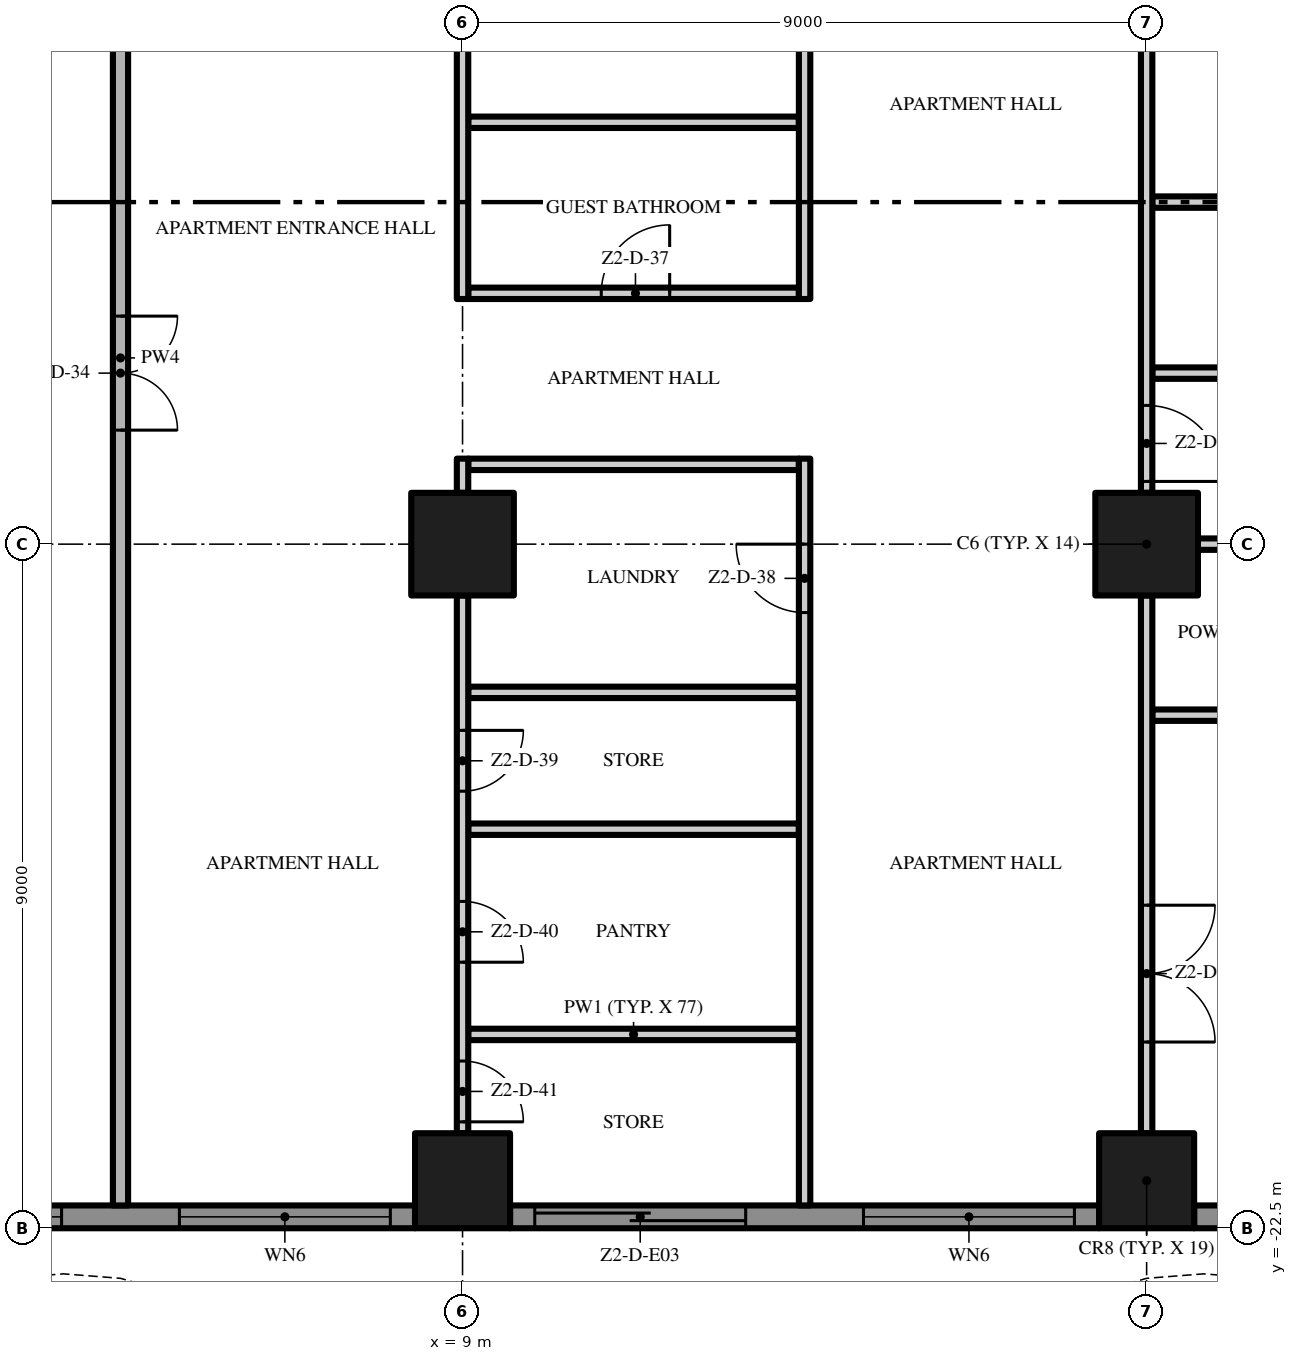
"""IFC4 building model, lengths in metres.
Left out: names, types, materials, properties, quantities, classifications, styles, units other than length and angle.
Written with IfcOpenShell. Run it as: python <this file> out.ifc"""

import sys

from ifc_helpers import new_model, si_unit, direction, frame, frame_2d, origin, origin_2d, place, context, subcontext, project, spatial, polyline, rectangle, outline, extrude, element, fill, save


model = new_model("IFC4")
c1 = context("Model", 3, precision=1e-05, world=origin(), true_north=direction((0.0, 1.0)))
c2 = subcontext(c1, "Body", "Model", "MODEL_VIEW")
j1 = project(units=[si_unit("LENGTHUNIT", "METRE"), si_unit("PLANEANGLEUNIT", "RADIAN")], contexts=[c1])
p1 = place(None, origin())
s1 = spatial("IfcSite", under=j1, at=p1, CompositionType="ELEMENT")
p2 = place(p1, origin())
s2 = spatial("IfcBuilding", under=s1, at=p2, CompositionType="ELEMENT")
p3 = place(p2, frame((0.0, 0.0, 107.4)))
s3 = spatial("IfcBuildingStorey", under=s2, at=p3, CompositionType="ELEMENT", Elevation=107.4)
p4 = place(p3, frame((18.0, -13.5, 0.0), z_axis=(0.0, 0.0, 1.0), x_axis=(1.0, 0.0, 0.0)))
e1 = element("IfcColumn", 1, at=p4, inside=s3, PredefinedType="COLUMN", context=c2, shape_type="SweptSolid", body=[
    extrude(rectangle(XDim=1.35, YDim=1.35, at=origin_2d()), origin(), (0.0, 0.0, 1.0), 3.5),
])
p5 = place(p3, frame((18.0, -21.875, 0.0), z_axis=(0.0, 0.0, 1.0), x_axis=(1.0, 0.0, 0.0)))
e2 = element("IfcColumn", 2, at=p5, inside=s3, PredefinedType="COLUMN", context=c2, shape_type="SweptSolid", body=[
    extrude(rectangle(XDim=1.25, YDim=1.25, at=origin_2d()), origin(), (0.0, 0.0, 1.0), 3.5),
])
p6 = place(p3, frame((9.0, -13.5, 0.0), z_axis=(0.0, 0.0, 1.0), x_axis=(1.0, 0.0, 0.0)))
e3 = element("IfcColumn", 3, at=p6, inside=s3, PredefinedType="COLUMN", context=c2, shape_type="SweptSolid", body=[
    extrude(rectangle(XDim=1.35, YDim=1.35, at=origin_2d()), origin(), (0.0, 0.0, 1.0), 3.5),
])
p7 = place(p3, frame((9.0, -21.875, 0.0), z_axis=(0.0, 0.0, 1.0), x_axis=(1.0, 0.0, 0.0)))
e4 = element("IfcColumn", 4, at=p7, inside=s3, PredefinedType="COLUMN", context=c2, shape_type="SweptSolid", body=[
    extrude(rectangle(XDim=1.25, YDim=1.25, at=origin_2d()), origin(), (0.0, 0.0, 1.0), 3.5),
])
p8 = place(p3, frame((8.375, -22.35, 0.0), z_axis=(0.0, 0.0, 1.0), x_axis=(-1.0, 0.0, 0.0)))
e5 = element("IfcWall", 5, at=p8, inside=s3, PredefinedType="SOLIDWALL", context=c2, shape_type="SweptSolid", body=[
    extrude(rectangle(XDim=7.75, YDim=0.3, at=frame_2d((3.875, 0.0))), origin(), (0.0, 0.0, 1.0), 3.5),
])
p9 = place(p8, frame((4.65, 0.0, 0.45)))
e6 = element("IfcOpeningElement", 6, at=p9, cuts=e5, PredefinedType="OPENING", context=c2, shape_type="SweptSolid", body=[
    extrude(rectangle(XDim=2.775, YDim=2.65, at=frame_2d((1.387, 1.325))), frame((0.0, 0.16, 0.0), z_axis=(0.0, -1.0, 0.0), x_axis=(1.0, 0.0, 0.0)), (0.0, 0.0, 1.0), 0.32),
])
p10 = place(p8, frame((0.325, 0.0, 0.45)))
e7 = element("IfcOpeningElement", 7, at=p10, cuts=e5, PredefinedType="OPENING", context=c2, shape_type="SweptSolid", body=[
    extrude(rectangle(XDim=2.775, YDim=2.65, at=frame_2d((1.387, 1.325))), frame((0.0, 0.16, 0.0), z_axis=(0.0, -1.0, 0.0), x_axis=(1.0, 0.0, 0.0)), (0.0, 0.0, 1.0), 0.32),
])
p11 = place(p3, frame((17.375, -22.35, 0.0), z_axis=(0.0, 0.0, 1.0), x_axis=(-1.0, 0.0, 0.0)))
e8 = element("IfcWall", 8, at=p11, inside=s3, PredefinedType="SOLIDWALL", context=c2, shape_type="SweptSolid", body=[
    extrude(rectangle(XDim=7.75, YDim=0.3, at=frame_2d((3.875, 0.0))), origin(), (0.0, 0.0, 1.0), 3.5),
])
p12 = place(p11, frame((4.65, 0.0, 0.0)))
e9 = element("IfcOpeningElement", 9, at=p12, cuts=e8, PredefinedType="OPENING", context=c2, shape_type="SweptSolid", body=[
    extrude(rectangle(XDim=2.775, YDim=2.4, at=frame_2d((1.387, 1.2))), frame((0.0, 0.16, 0.0), z_axis=(0.0, -1.0, 0.0), x_axis=(1.0, 0.0, 0.0)), (0.0, 0.0, 1.0), 0.32),
])
p13 = place(p11, frame((0.325, 0.0, 0.45)))
e10 = element("IfcOpeningElement", 10, at=p13, cuts=e8, PredefinedType="OPENING", context=c2, shape_type="SweptSolid", body=[
    extrude(rectangle(XDim=2.775, YDim=2.65, at=frame_2d((1.387, 1.325))), frame((0.0, 0.16, 0.0), z_axis=(0.0, -1.0, 0.0), x_axis=(1.0, 0.0, 0.0)), (0.0, 0.0, 1.0), 0.32),
])
p14 = place(p3, frame((22.5, -22.35, 0.0), z_axis=(0.0, 0.0, 1.0), x_axis=(-1.0, 0.0, 0.0)))
e11 = element("IfcWall", 11, at=p14, inside=s3, PredefinedType="SOLIDWALL", context=c2, shape_type="SweptSolid", body=[
    extrude(rectangle(XDim=3.875, YDim=0.3, at=frame_2d((1.938, 0.0))), origin(), (0.0, 0.0, 1.0), 3.5),
])
p15 = place(p14, frame((0.775, 0.0, 0.45)))
e12 = element("IfcOpeningElement", 12, at=p15, cuts=e11, PredefinedType="OPENING", context=c2, shape_type="SweptSolid", body=[
    extrude(rectangle(XDim=2.775, YDim=2.65, at=frame_2d((1.387, 1.325))), frame((0.0, 0.16, 0.0), z_axis=(0.0, -1.0, 0.0), x_axis=(1.0, 0.0, 0.0)), (0.0, 0.0, 1.0), 0.32),
])
p16 = place(p3, origin())
e13 = element("IfcWall", 13, at=p16, inside=s3, PredefinedType="USERDEFINED", context=c2, shape_type="SweptSolid", body=[
    extrude(outline(polyline([(-22.5, -24.3), (-21.0, -25.005), (-19.5, -25.441), (-18.75, -25.5), (-18.0, -25.441), (-16.5, -25.005), (-15.0, -24.3), (-13.5, -23.595), (-12.0, -23.159), (-11.25, -23.1), (-10.5, -23.159), (-9.0, -23.595), (-7.5, -24.3), (-6.0, -25.005), (-4.5, -25.441), (-3.75, -25.5), (-3.0, -25.441), (-1.5, -25.005), (0.0, -24.3), (1.5, -23.595), (3.0, -23.159), (3.75, -23.1), (4.5, -23.159), (6.0, -23.595), (7.5, -24.3), (9.0, -25.005), (10.5, -25.441), (11.25, -25.5), (12.0, -25.441), (13.5, -25.005), (15.0, -24.3), (16.5, -23.595), (18.0, -23.159), (18.75, -23.1), (19.5, -23.159), (21.0, -23.595), (22.5, -24.3), (22.606, -24.074), (21.089, -23.36), (19.545, -22.911), (18.75, -22.849), (17.955, -22.911), (16.411, -23.36), (14.894, -24.074), (13.411, -24.771), (11.955, -25.194), (11.25, -25.249), (10.545, -25.194), (9.089, -24.771), (7.606, -24.074), (6.089, -23.36), (4.545, -22.911), (3.75, -22.849), (2.955, -22.911), (1.411, -23.36), (-0.106, -24.074), (-1.589, -24.771), (-3.045, -25.194), (-3.75, -25.249), (-4.455, -25.194), (-5.911, -24.771), (-7.394, -24.074), (-8.911, -23.36), (-10.455, -22.911), (-11.25, -22.849), (-12.045, -22.911), (-13.589, -23.36), (-15.106, -24.074), (-16.589, -24.771), (-18.045, -25.194), (-18.75, -25.249), (-19.455, -25.194), (-20.911, -24.771), (-22.394, -24.074), (-22.5, -24.3)])), origin(), (0.0, 0.0, 1.0), 0.9),
])
for number, where, z_axis, x_axis in (
    (14, (9.075, -19.95, 0.0), (0.0, 0.0, 1.0), (1.0, 0.0, 0.0)),
    (15, (9.075, -17.25, 0.0), (0.0, 0.0, 1.0), (1.0, 0.0, 0.0)),
):
    element("IfcWall", number, at=place(p3, frame(where, z_axis=z_axis, x_axis=x_axis)), inside=s3, PredefinedType="PARTITIONING", context=c2, shape_type="SweptSolid", body=[
        extrude(rectangle(XDim=4.35, YDim=0.15, at=frame_2d((2.175, 0.0))), origin(), (0.0, 0.0, 1.0), 3.5),
    ])
p17 = place(p3, frame((18.075, -15.75, 0.0), z_axis=(0.0, 0.0, 1.0), x_axis=(1.0, 0.0, 0.0)))
e16 = element("IfcWall", 16, at=p17, inside=s3, PredefinedType="PARTITIONING", context=c2, shape_type="SweptSolid", body=[
    extrude(rectangle(XDim=2.85, YDim=0.15, at=frame_2d((1.425, 0.0))), origin(), (0.0, 0.0, 1.0), 3.5),
])
p18 = place(p3, frame((9.075, -15.45, 0.0), z_axis=(0.0, 0.0, 1.0), x_axis=(1.0, 0.0, 0.0)))
e17 = element("IfcWall", 17, at=p18, inside=s3, PredefinedType="PARTITIONING", context=c2, shape_type="SweptSolid", body=[
    extrude(rectangle(XDim=4.35, YDim=0.15, at=frame_2d((2.175, 0.0))), origin(), (0.0, 0.0, 1.0), 3.5),
])
p19 = place(p3, frame((18.675, -13.5, 0.0), z_axis=(0.0, 0.0, 1.0), x_axis=(1.0, 0.0, 0.0)))
e18 = element("IfcWall", 18, at=p19, inside=s3, PredefinedType="PARTITIONING", context=c2, shape_type="SweptSolid", body=[
    extrude(rectangle(XDim=7.075, YDim=0.15, at=frame_2d((3.538, 0.0))), origin(), (0.0, 0.0, 1.0), 3.5),
])
p20 = place(p3, frame((9.075, -12.45, 0.0), z_axis=(0.0, 0.0, 1.0), x_axis=(1.0, 0.0, 0.0)))
e19 = element("IfcWall", 19, at=p20, inside=s3, PredefinedType="PARTITIONING", context=c2, shape_type="SweptSolid", body=[
    extrude(rectangle(XDim=4.35, YDim=0.15, at=frame_2d((2.175, 0.0))), origin(), (0.0, 0.0, 1.0), 3.5),
])
p21 = place(p3, frame((18.075, -11.25, 0.0), z_axis=(0.0, 0.0, 1.0), x_axis=(1.0, 0.0, 0.0)))
e20 = element("IfcWall", 20, at=p21, inside=s3, PredefinedType="PARTITIONING", context=c2, shape_type="SweptSolid", body=[
    extrude(rectangle(XDim=2.85, YDim=0.15, at=frame_2d((1.425, 0.0))), origin(), (0.0, 0.0, 1.0), 3.5),
])
p22 = place(p3, frame((9.075, -10.2, 0.0), z_axis=(0.0, 0.0, 1.0), x_axis=(1.0, 0.0, 0.0)))
e21 = element("IfcWall", 21, at=p22, inside=s3, PredefinedType="PARTITIONING", context=c2, shape_type="SweptSolid", body=[
    extrude(rectangle(XDim=4.35, YDim=0.15, at=frame_2d((2.175, 0.0))), origin(), (0.0, 0.0, 1.0), 3.5),
])
p23 = place(p22, frame((1.75, 0.0, 0.0)))
e22 = element("IfcOpeningElement", 22, at=p23, cuts=e21, PredefinedType="OPENING", context=c2, shape_type="SweptSolid", body=[
    extrude(rectangle(XDim=0.9, YDim=2.1, at=frame_2d((0.45, 1.05))), frame((0.0, 0.085, 0.0), z_axis=(0.0, -1.0, 0.0), x_axis=(1.0, 0.0, 0.0)), (0.0, 0.0, 1.0), 0.17),
])
p24 = place(p3, frame((18.075, -9.0, 0.0), z_axis=(0.0, 0.0, 1.0), x_axis=(1.0, 0.0, 0.0)))
e23 = element("IfcWall", 23, at=p24, inside=s3, PredefinedType="PARTITIONING", context=c2, shape_type="SweptSolid", body=[
    extrude(rectangle(XDim=2.85, YDim=0.15, at=frame_2d((1.425, 0.0))), origin(), (0.0, 0.0, 1.0), 3.5),
])
p25 = place(p3, frame((9.075, -7.95, 0.0), z_axis=(0.0, 0.0, 1.0), x_axis=(1.0, 0.0, 0.0)))
e24 = element("IfcWall", 24, at=p25, inside=s3, PredefinedType="PARTITIONING", context=c2, shape_type="SweptSolid", body=[
    extrude(rectangle(XDim=4.35, YDim=0.15, at=frame_2d((2.175, 0.0))), origin(), (0.0, 0.0, 1.0), 3.5),
])
p26 = place(p3, frame((4.5, 0.1, 0.0), z_axis=(0.0, 0.0, 1.0), x_axis=(0.0, -1.0, 0.0)))
e25 = element("IfcWall", 25, at=p26, inside=s3, PredefinedType="PARTITIONING", context=c2, shape_type="SweptSolid", body=[
    extrude(rectangle(XDim=22.3, YDim=0.2, at=frame_2d((11.15, 0.0))), origin(), (0.0, 0.0, 1.0), 3.5),
])
p27 = place(p26, frame((10.6, 0.0, 0.0)))
e26 = element("IfcOpeningElement", 26, at=p27, cuts=e25, PredefinedType="OPENING", context=c2, shape_type="SweptSolid", body=[
    extrude(rectangle(XDim=1.5, YDim=2.4, at=frame_2d((0.75, 1.2))), frame((0.0, 0.11, 0.0), z_axis=(0.0, -1.0, 0.0), x_axis=(1.0, 0.0, 0.0)), (0.0, 0.0, 1.0), 0.22),
])
p28 = place(p3, frame((9.0, -14.175, 0.0), z_axis=(0.0, 0.0, 1.0), x_axis=(0.0, -1.0, 0.0)))
e27 = element("IfcWall", 27, at=p28, inside=s3, PredefinedType="PARTITIONING", context=c2, shape_type="SweptSolid", body=[
    extrude(rectangle(XDim=7.075, YDim=0.15, at=frame_2d((3.538, 0.0))), origin(), (0.0, 0.0, 1.0), 3.5),
])
p29 = place(p28, frame((1.775, 0.0, 0.0)))
e28 = element("IfcOpeningElement", 28, at=p29, cuts=e27, PredefinedType="OPENING", context=c2, shape_type="SweptSolid", body=[
    extrude(rectangle(XDim=0.8, YDim=2.0, at=frame_2d((0.4, 1.0))), frame((0.0, 0.085, 0.0), z_axis=(0.0, -1.0, 0.0), x_axis=(1.0, 0.0, 0.0)), (0.0, 0.0, 1.0), 0.17),
])
p30 = place(p28, frame((4.025, 0.0, 0.0)))
e29 = element("IfcOpeningElement", 29, at=p30, cuts=e27, PredefinedType="OPENING", context=c2, shape_type="SweptSolid", body=[
    extrude(rectangle(XDim=0.8, YDim=2.0, at=frame_2d((0.4, 1.0))), frame((0.0, 0.085, 0.0), z_axis=(0.0, -1.0, 0.0), x_axis=(1.0, 0.0, 0.0)), (0.0, 0.0, 1.0), 0.17),
])
p31 = place(p28, frame((6.125, 0.0, 0.0)))
e30 = element("IfcOpeningElement", 30, at=p31, cuts=e27, PredefinedType="OPENING", context=c2, shape_type="SweptSolid", body=[
    extrude(rectangle(XDim=0.8, YDim=2.0, at=frame_2d((0.4, 1.0))), frame((0.0, 0.085, 0.0), z_axis=(0.0, -1.0, 0.0), x_axis=(1.0, 0.0, 0.0)), (0.0, 0.0, 1.0), 0.17),
])
p32 = place(p3, frame((9.0, -12.825, 0.0), z_axis=(0.0, 0.0, 1.0), x_axis=(0.0, 1.0, 0.0)))
e31 = element("IfcWall", 31, at=p32, inside=s3, PredefinedType="PARTITIONING", context=c2, shape_type="SweptSolid", body=[
    extrude(rectangle(XDim=0.45, YDim=0.15, at=frame_2d((0.225, 0.0))), origin(), (0.0, 0.0, 1.0), 3.5),
])
p33 = place(p3, frame((9.0, -5.175, 0.0), z_axis=(0.0, 0.0, 1.0), x_axis=(0.0, -1.0, 0.0)))
e32 = element("IfcWall", 32, at=p33, inside=s3, PredefinedType="PARTITIONING", context=c2, shape_type="SweptSolid", body=[
    extrude(rectangle(XDim=5.1, YDim=0.15, at=frame_2d((2.55, 0.0))), origin(), (0.0, 0.0, 1.0), 3.5),
])
p34 = place(p33, frame((0.15, 0.0, 0.0)))
e33 = element("IfcOpeningElement", 33, at=p34, cuts=e32, PredefinedType="OPENING", context=c2, shape_type="SweptSolid", body=[
    extrude(rectangle(XDim=1.0, YDim=2.4, at=frame_2d((0.5, 1.2))), frame((0.0, 0.085, 0.0), z_axis=(0.0, -1.0, 0.0), x_axis=(1.0, 0.0, 0.0)), (0.0, 0.0, 1.0), 0.17),
])
p35 = place(p3, frame((13.5, -22.2, 0.0), z_axis=(0.0, 0.0, 1.0), x_axis=(0.0, 1.0, 0.0)))
e34 = element("IfcWall", 34, at=p35, inside=s3, PredefinedType="PARTITIONING", context=c2, shape_type="SweptSolid", body=[
    extrude(rectangle(XDim=9.825, YDim=0.15, at=frame_2d((4.912, 0.0))), origin(), (0.0, 0.0, 1.0), 3.5),
])
p36 = place(p35, frame((7.8, 0.0, 0.0)))
e35 = element("IfcOpeningElement", 35, at=p36, cuts=e34, PredefinedType="OPENING", context=c2, shape_type="SweptSolid", body=[
    extrude(rectangle(XDim=0.9, YDim=2.1, at=frame_2d((0.45, 1.05))), frame((0.0, 0.085, 0.0), z_axis=(0.0, -1.0, 0.0), x_axis=(1.0, 0.0, 0.0)), (0.0, 0.0, 1.0), 0.17),
])
p37 = place(p3, frame((13.5, -10.275, 0.0), z_axis=(0.0, 0.0, 1.0), x_axis=(0.0, 1.0, 0.0)))
e36 = element("IfcWall", 36, at=p37, inside=s3, PredefinedType="PARTITIONING", context=c2, shape_type="SweptSolid", body=[
    extrude(rectangle(XDim=10.175, YDim=0.15, at=frame_2d((5.088, 0.0))), origin(), (0.0, 0.0, 1.0), 3.5),
])
p38 = place(p3, frame((18.0, -14.175, 0.0), z_axis=(0.0, 0.0, 1.0), x_axis=(0.0, -1.0, 0.0)))
e37 = element("IfcWall", 37, at=p38, inside=s3, PredefinedType="PARTITIONING", context=c2, shape_type="SweptSolid", body=[
    extrude(rectangle(XDim=7.075, YDim=0.15, at=frame_2d((3.538, 0.0))), origin(), (0.0, 0.0, 1.0), 3.5),
])
p39 = place(p38, frame((4.075, 0.0, 0.0)))
e38 = element("IfcOpeningElement", 38, at=p39, cuts=e37, PredefinedType="OPENING", context=c2, shape_type="SweptSolid", body=[
    extrude(rectangle(XDim=1.8, YDim=2.4, at=frame_2d((0.9, 1.2))), frame((0.0, 0.085, 0.0), z_axis=(0.0, -1.0, 0.0), x_axis=(1.0, 0.0, 0.0)), (0.0, 0.0, 1.0), 0.17),
])
p40 = place(p3, frame((18.0, -5.175, 0.0), z_axis=(0.0, 0.0, 1.0), x_axis=(0.0, -1.0, 0.0)))
e39 = element("IfcWall", 39, at=p40, inside=s3, PredefinedType="PARTITIONING", context=c2, shape_type="SweptSolid", body=[
    extrude(rectangle(XDim=7.65, YDim=0.15, at=frame_2d((3.825, 0.0))), origin(), (0.0, 0.0, 1.0), 3.5),
])
p41 = place(p40, frame((0.15, 0.0, 0.0)))
e40 = element("IfcOpeningElement", 40, at=p41, cuts=e39, PredefinedType="OPENING", context=c2, shape_type="SweptSolid", body=[
    extrude(rectangle(XDim=1.0, YDim=2.4, at=frame_2d((0.5, 1.2))), frame((0.0, 0.085, 0.0), z_axis=(0.0, -1.0, 0.0), x_axis=(1.0, 0.0, 0.0)), (0.0, 0.0, 1.0), 0.17),
])
p42 = place(p40, frame((6.5, 0.0, 0.0)))
e41 = element("IfcOpeningElement", 41, at=p42, cuts=e39, PredefinedType="OPENING", context=c2, shape_type="SweptSolid", body=[
    extrude(rectangle(XDim=1.0, YDim=2.4, at=frame_2d((0.5, 1.2))), frame((0.0, 0.085, 0.0), z_axis=(0.0, -1.0, 0.0), x_axis=(1.0, 0.0, 0.0)), (0.0, 0.0, 1.0), 0.17),
])
p43 = place(p9, origin())
e42 = element("IfcWindow", 42, at=p43, inside=s3, PartitioningType="SINGLE_PANEL", PredefinedType="WINDOW", context=c2, shape_type="SweptSolid", body=[
    extrude(rectangle(XDim=2.775, YDim=2.65, at=frame_2d((1.387, 1.325))), frame((0.0, 0.03, 0.0), z_axis=(0.0, -1.0, 0.0), x_axis=(1.0, 0.0, 0.0)), (0.0, 0.0, 1.0), 0.06),
])
fill(e6, e42)
p44 = place(p10, origin())
e43 = element("IfcWindow", 43, at=p44, inside=s3, PartitioningType="SINGLE_PANEL", PredefinedType="WINDOW", context=c2, shape_type="SweptSolid", body=[
    extrude(rectangle(XDim=2.775, YDim=2.65, at=frame_2d((1.387, 1.325))), frame((0.0, 0.03, 0.0), z_axis=(0.0, -1.0, 0.0), x_axis=(1.0, 0.0, 0.0)), (0.0, 0.0, 1.0), 0.06),
])
fill(e7, e43)
p45 = place(p12, origin())
e44 = element("IfcDoor", 44, at=p45, inside=s3, OperationType="SINGLE_SWING_LEFT", PredefinedType="DOOR", context=c2, shape_type="SweptSolid", body=[
    extrude(rectangle(XDim=2.775, YDim=2.4, at=frame_2d((1.387, 1.2))), frame((0.0, 0.025, 0.0), z_axis=(0.0, -1.0, 0.0), x_axis=(1.0, 0.0, 0.0)), (0.0, 0.0, 1.0), 0.05),
])
fill(e9, e44)
p46 = place(p13, origin())
e45 = element("IfcWindow", 45, at=p46, inside=s3, PartitioningType="SINGLE_PANEL", PredefinedType="WINDOW", context=c2, shape_type="SweptSolid", body=[
    extrude(rectangle(XDim=2.775, YDim=2.65, at=frame_2d((1.387, 1.325))), frame((0.0, 0.03, 0.0), z_axis=(0.0, -1.0, 0.0), x_axis=(1.0, 0.0, 0.0)), (0.0, 0.0, 1.0), 0.06),
])
fill(e10, e45)
p47 = place(p27, origin())
e46 = element("IfcDoor", 46, at=p47, inside=s3, OperationType="DOUBLE_DOOR_SINGLE_SWING", PredefinedType="DOOR", context=c2, shape_type="SweptSolid", body=[
    extrude(rectangle(XDim=1.5, YDim=2.4, at=frame_2d((0.75, 1.2))), frame((0.0, 0.025, 0.0), z_axis=(0.0, -1.0, 0.0), x_axis=(1.0, 0.0, 0.0)), (0.0, 0.0, 1.0), 0.05),
])
fill(e26, e46)
p48 = place(p23, origin())
e47 = element("IfcDoor", 47, at=p48, inside=s3, OperationType="SINGLE_SWING_RIGHT", PredefinedType="DOOR", context=c2, shape_type="SweptSolid", body=[
    extrude(rectangle(XDim=0.9, YDim=2.1, at=frame_2d((0.45, 1.05))), frame((0.0, 0.025, 0.0), z_axis=(0.0, -1.0, 0.0), x_axis=(1.0, 0.0, 0.0)), (0.0, 0.0, 1.0), 0.05),
])
fill(e22, e47)
p49 = place(p36, origin())
e48 = element("IfcDoor", 48, at=p49, inside=s3, OperationType="SINGLE_SWING_RIGHT", PredefinedType="DOOR", context=c2, shape_type="SweptSolid", body=[
    extrude(rectangle(XDim=0.9, YDim=2.1, at=frame_2d((0.45, 1.05))), frame((0.0, 0.025, 0.0), z_axis=(0.0, -1.0, 0.0), x_axis=(1.0, 0.0, 0.0)), (0.0, 0.0, 1.0), 0.05),
])
fill(e35, e48)
p50 = place(p29, origin())
e49 = element("IfcDoor", 49, at=p50, inside=s3, OperationType="SINGLE_SWING_LEFT", PredefinedType="DOOR", context=c2, shape_type="SweptSolid", body=[
    extrude(rectangle(XDim=0.8, YDim=2.0, at=frame_2d((0.4, 1.0))), frame((0.0, 0.025, 0.0), z_axis=(0.0, -1.0, 0.0), x_axis=(1.0, 0.0, 0.0)), (0.0, 0.0, 1.0), 0.05),
])
fill(e28, e49)
p51 = place(p30, origin())
e50 = element("IfcDoor", 50, at=p51, inside=s3, OperationType="SINGLE_SWING_RIGHT", PredefinedType="DOOR", context=c2, shape_type="SweptSolid", body=[
    extrude(rectangle(XDim=0.8, YDim=2.0, at=frame_2d((0.4, 1.0))), frame((0.0, 0.025, 0.0), z_axis=(0.0, -1.0, 0.0), x_axis=(1.0, 0.0, 0.0)), (0.0, 0.0, 1.0), 0.05),
])
fill(e29, e50)
p52 = place(p31, origin())
e51 = element("IfcDoor", 51, at=p52, inside=s3, OperationType="SINGLE_SWING_RIGHT", PredefinedType="DOOR", context=c2, shape_type="SweptSolid", body=[
    extrude(rectangle(XDim=0.8, YDim=2.0, at=frame_2d((0.4, 1.0))), frame((0.0, 0.025, 0.0), z_axis=(0.0, -1.0, 0.0), x_axis=(1.0, 0.0, 0.0)), (0.0, 0.0, 1.0), 0.05),
])
fill(e30, e51)
p53 = place(p42, origin())
e52 = element("IfcDoor", 52, at=p53, inside=s3, OperationType="SINGLE_SWING_RIGHT", PredefinedType="DOOR", context=c2, shape_type="SweptSolid", body=[
    extrude(rectangle(XDim=1.0, YDim=2.4, at=frame_2d((0.5, 1.2))), frame((0.0, 0.025, 0.0), z_axis=(0.0, -1.0, 0.0), x_axis=(1.0, 0.0, 0.0)), (0.0, 0.0, 1.0), 0.05),
])
fill(e41, e52)
p54 = place(p39, origin())
e53 = element("IfcDoor", 53, at=p54, inside=s3, OperationType="DOUBLE_DOOR_SINGLE_SWING", PredefinedType="DOOR", context=c2, shape_type="SweptSolid", body=[
    extrude(rectangle(XDim=1.8, YDim=2.4, at=frame_2d((0.9, 1.2))), frame((0.0, 0.025, 0.0), z_axis=(0.0, -1.0, 0.0), x_axis=(1.0, 0.0, 0.0)), (0.0, 0.0, 1.0), 0.05),
])
fill(e38, e53)
save(model, sys.argv[1])
